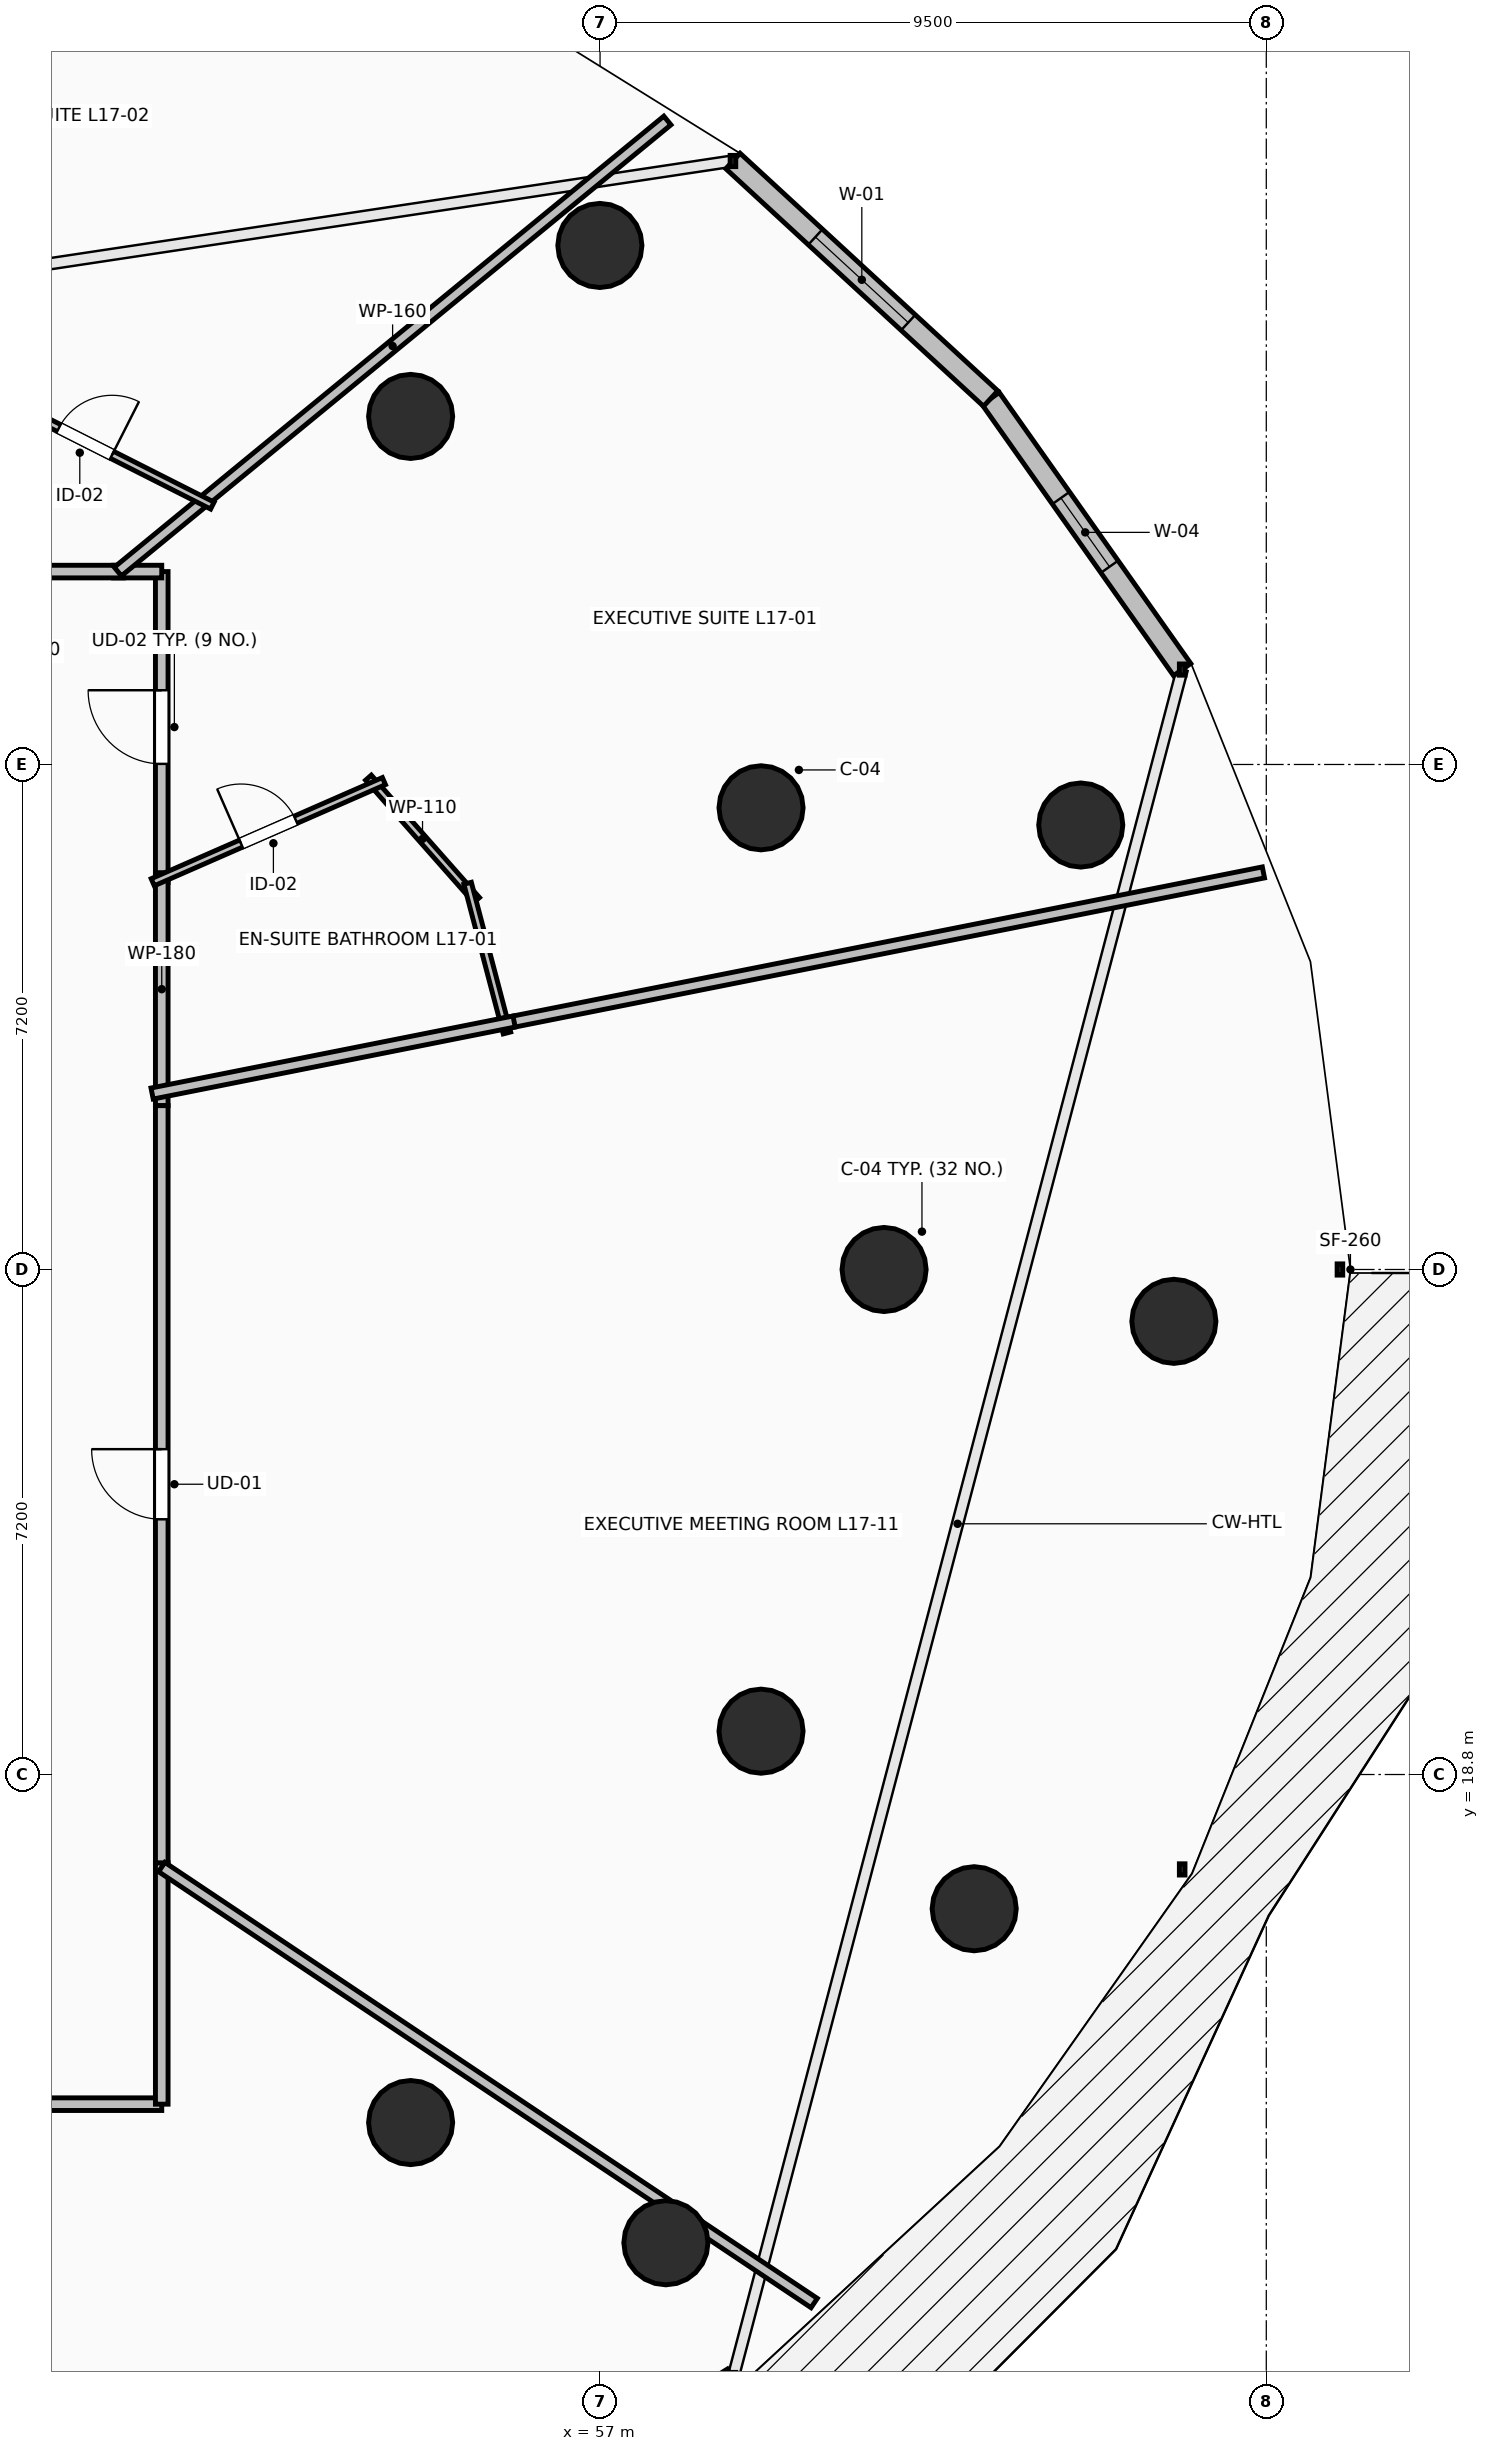
"""IFC4 building model, lengths in metres.
Left out: names, types, materials, properties, quantities, classifications, styles, units other than length and angle.
Written with IfcOpenShell. Run it as: python <this file> out.ifc"""

import sys

from ifc_helpers import new_model, si_unit, direction, frame, frame_2d, origin, origin_2d, place, context, subcontext, project, spatial, rectangle, circle, extrude, element, fill, save


model = new_model("IFC4")
c1 = context("Model", 3, precision=1e-05, world=origin(), true_north=direction((0.0, 1.0)))
c2 = subcontext(c1, "Body", "Model", "MODEL_VIEW")
j1 = project(units=[si_unit("LENGTHUNIT", "METRE"), si_unit("PLANEANGLEUNIT", "RADIAN")], contexts=[c1])
p1 = place(None, origin())
s1 = spatial("IfcSite", under=j1, at=p1, CompositionType="ELEMENT")
p2 = place(p1, origin())
s2 = spatial("IfcBuilding", under=s1, at=p2, CompositionType="ELEMENT")
p3 = place(p2, frame((0.0, 0.0, 66.0)))
s3 = spatial("IfcBuildingStorey", under=s2, at=p3, CompositionType="ELEMENT", Elevation=66.0)
for number, where, z_axis, x_axis in (
    (1, (61.05, 26.0, 0.0), (0.0, 0.0, 1.0), (1.0, 0.0, 0.0)),
    (2, (59.295, 32.582, 0.0), (0.0, 0.0, 1.0), (0.924, 0.383, 0.0)),
    (3, (54.299, 38.162, 0.0), (0.0, 0.0, 1.0), (0.707, 0.707, 0.0)),
    (4, (54.299, 13.838, 0.0), (0.0, 0.0, 1.0), (0.707, -0.707, 0.0)),
    (5, (59.295, 19.418, 0.0), (0.0, 0.0, 1.0), (0.924, -0.383, 0.0)),
    (6, (65.182, 25.261, 0.0), (0.0, 0.0, 1.0), (1.0, 0.0, 0.0)),
    (7, (63.854, 32.337, 0.0), (0.0, 0.0, 1.0), (0.924, 0.383, 0.0)),
    (8, (56.997, 40.6, 0.0), (0.0, 0.0, 1.0), (0.707, 0.707, 0.0)),
    (9, (57.939, 12.124, 0.0), (0.0, 0.0, 1.0), (0.707, -0.707, 0.0)),
    (10, (62.335, 16.886, 0.0), (0.0, 0.0, 1.0), (0.924, -0.383, 0.0)),
):
    element("IfcColumn", number, at=place(p3, frame(where, z_axis=z_axis, x_axis=x_axis)), inside=s3, PredefinedType="COLUMN", context=c2, shape_type="SweptSolid", body=[
        extrude(circle(Radius=0.6, at=origin_2d()), origin(), (0.0, 0.0, 1.0), 3.5),
    ])
p4 = place(p3, frame((65.301, 34.553, 0.0), z_axis=(0.0, 0.0, 1.0), x_axis=(-0.577130815624, 0.816651713803, 0.0)))
e11 = element("IfcWall", 11, at=p4, inside=s3, PredefinedType="STANDARD", context=c2, shape_type="SweptSolid", body=[
    extrude(rectangle(XDim=4.731, YDim=0.3, at=frame_2d((2.366, 0.0))), origin(), (0.0, 0.0, 1.0), 3.15),
])
p5 = place(p4, frame((1.795, 0.0, 0.85)))
e12 = element("IfcOpeningElement", 12, at=p5, cuts=e11, PredefinedType="OPENING", context=c2, shape_type="SweptSolid", body=[
    extrude(rectangle(XDim=1.2, YDim=1.95, at=frame_2d((0.6, 0.975))), frame((0.0, 0.165, 0.0), z_axis=(0.0, -1.0, 0.0), x_axis=(1.0, 0.0, 0.0)), (0.0, 0.0, 1.0), 0.33),
])
p6 = place(p3, frame((62.57, 38.417, 0.0), z_axis=(0.0, 0.0, 1.0), x_axis=(-0.735342629635, 0.677695519419, 0.0)))
e13 = element("IfcWall", 13, at=p6, inside=s3, PredefinedType="STANDARD", context=c2, shape_type="SweptSolid", body=[
    extrude(rectangle(XDim=4.997, YDim=0.3, at=frame_2d((2.499, 0.0))), origin(), (0.0, 0.0, 1.0), 3.15),
])
p7 = place(p6, frame((1.599, 0.0, 0.85)))
e14 = element("IfcOpeningElement", 14, at=p7, cuts=e13, PredefinedType="OPENING", context=c2, shape_type="SweptSolid", body=[
    extrude(rectangle(XDim=1.8, YDim=2.1, at=frame_2d((0.9, 1.05))), frame((0.0, 0.165, 0.0), z_axis=(0.0, -1.0, 0.0), x_axis=(1.0, 0.0, 0.0)), (0.0, 0.0, 1.0), 0.33),
])
p8 = place(p3, frame((54.417, 7.417, 0.0), z_axis=(0.0, 0.0, 1.0), x_axis=(0.849633724826, 0.527373239404, 0.0)))
e15 = element("IfcWall", 15, at=p8, inside=s3, PredefinedType="STANDARD", context=c2, shape_type="SweptSolid", body=[
    extrude(rectangle(XDim=5.271, YDim=0.3, at=frame_2d((2.635, 0.0))), origin(), (0.0, 0.0, 1.0), 3.15),
])
p9 = place(p8, frame((1.735, 0.0, 0.85)))
e16 = element("IfcOpeningElement", 16, at=p9, cuts=e15, PredefinedType="OPENING", context=c2, shape_type="SweptSolid", body=[
    extrude(rectangle(XDim=1.8, YDim=2.1, at=frame_2d((0.9, 1.05))), frame((0.0, 0.165, 0.0), z_axis=(0.0, -1.0, 0.0), x_axis=(1.0, 0.0, 0.0)), (0.0, 0.0, 1.0), 0.33),
])
p10 = place(p3, frame((50.75, 31.517, 0.0), z_axis=(0.0, 0.0, 1.0), x_axis=(0.0, 1.0, 0.0)))
e17 = element("IfcWall", 17, at=p10, inside=s3, PredefinedType="PARTITIONING", context=c2, shape_type="SweptSolid", body=[
    extrude(rectangle(XDim=4.433, YDim=0.18, at=frame_2d((2.216, 0.0))), origin(), (0.0, 0.0, 1.0), 2.342),
])
p11 = place(p10, frame((1.691, 0.0, 0.0)))
e18 = element("IfcOpeningElement", 18, at=p11, cuts=e17, PredefinedType="OPENING", context=c2, shape_type="SweptSolid", body=[
    extrude(rectangle(XDim=1.05, YDim=2.2, at=frame_2d((0.525, 1.1))), frame((0.0, 0.105, 0.0), z_axis=(0.0, -1.0, 0.0), x_axis=(1.0, 0.0, 0.0)), (0.0, 0.0, 1.0), 0.21),
])
p12 = place(p3, frame((50.75, 35.95, 0.0), z_axis=(0.0, 0.0, 1.0), x_axis=(-1.0, 0.0, 0.0)))
e19 = element("IfcWall", 19, at=p12, inside=s3, PredefinedType="PARTITIONING", context=c2, shape_type="SweptSolid", body=[
    extrude(rectangle(XDim=0.686, YDim=0.18, at=frame_2d((0.343, 0.0))), origin(), (0.0, 0.0, 1.0), 3.15),
])
p13 = place(p3, frame((50.75, 28.336, 0.0), z_axis=(0.0, 0.0, 1.0), x_axis=(0.0, 1.0, 0.0)))
e20 = element("IfcWall", 20, at=p13, inside=s3, PredefinedType="PARTITIONING", context=c2, shape_type="SweptSolid", body=[
    extrude(rectangle(XDim=3.321, YDim=0.18, at=frame_2d((1.661, 0.0))), origin(), (0.0, 0.0, 1.0), 3.15),
])
p14 = place(p3, frame((50.204, 35.95, 0.0), z_axis=(0.0, 0.0, 1.0), x_axis=(-1.0, 0.0, 0.0)))
e21 = element("IfcWall", 21, at=p14, inside=s3, PredefinedType="PARTITIONING", context=c2, shape_type="SweptSolid", body=[
    extrude(rectangle(XDim=4.424, YDim=0.18, at=frame_2d((2.212, 0.0))), origin(), (0.0, 0.0, 1.0), 2.342),
])
p15 = place(p3, frame((42.34, 14.1, 0.0), z_axis=(0.0, 0.0, 1.0), x_axis=(1.0, 0.0, 0.0)))
e22 = element("IfcWall", 22, at=p15, inside=s3, PredefinedType="PARTITIONING", context=c2, shape_type="SweptSolid", body=[
    extrude(rectangle(XDim=8.41, YDim=0.18, at=frame_2d((4.205, 0.0))), origin(), (0.0, 0.0, 1.0), 2.342),
])
p16 = place(p15, frame((3.705, 0.0, 0.0)))
e23 = element("IfcOpeningElement", 23, at=p16, cuts=e22, PredefinedType="OPENING", context=c2, shape_type="SweptSolid", body=[
    extrude(rectangle(XDim=1.0, YDim=2.15, at=frame_2d((0.5, 1.075))), frame((0.0, 0.105, 0.0), z_axis=(0.0, -1.0, 0.0), x_axis=(1.0, 0.0, 0.0)), (0.0, 0.0, 1.0), 0.21),
])
p17 = place(p3, frame((50.75, 14.1, 0.0), z_axis=(0.0, 0.0, 1.0), x_axis=(0.0, 1.0, 0.0)))
e24 = element("IfcWall", 24, at=p17, inside=s3, PredefinedType="PARTITIONING", context=c2, shape_type="SweptSolid", body=[
    extrude(rectangle(XDim=3.441, YDim=0.18, at=frame_2d((1.72, 0.0))), origin(), (0.0, 0.0, 1.0), 2.342),
])
p18 = place(p3, frame((50.75, 17.541, 0.0), z_axis=(0.0, 0.0, 1.0), x_axis=(0.0, 1.0, 0.0)))
e25 = element("IfcWall", 25, at=p18, inside=s3, PredefinedType="PARTITIONING", context=c2, shape_type="SweptSolid", body=[
    extrude(rectangle(XDim=10.795, YDim=0.18, at=frame_2d((5.397, 0.0))), origin(), (0.0, 0.0, 1.0), 2.342),
])
p19 = place(p18, frame((4.897, 0.0, 0.0)))
e26 = element("IfcOpeningElement", 26, at=p19, cuts=e25, PredefinedType="OPENING", context=c2, shape_type="SweptSolid", body=[
    extrude(rectangle(XDim=1.0, YDim=2.15, at=frame_2d((0.5, 1.075))), frame((0.0, 0.105, 0.0), z_axis=(0.0, -1.0, 0.0), x_axis=(1.0, 0.0, 0.0)), (0.0, 0.0, 1.0), 0.21),
])
p20 = place(p3, frame((53.697, 33.012, 0.0), z_axis=(0.0, 0.0, 1.0), x_axis=(0.66211021146, -0.749406477074, 0.0)))
e27 = element("IfcWall", 27, at=p20, inside=s3, PredefinedType="PARTITIONING", context=c2, shape_type="SweptSolid", body=[
    extrude(rectangle(XDim=2.33, YDim=0.11, at=frame_2d((1.165, 0.0))), origin(), (0.0, 0.0, 1.0), 2.342),
])
p21 = place(p3, frame((55.111, 31.506, 0.0), z_axis=(0.0, 0.0, 1.0), x_axis=(0.254389812051, -0.967101764823, 0.0)))
e28 = element("IfcWall", 28, at=p21, inside=s3, PredefinedType="PARTITIONING", context=c2, shape_type="SweptSolid", body=[
    extrude(rectangle(XDim=2.206, YDim=0.11, at=frame_2d((1.103, 0.0))), origin(), (0.0, 0.0, 1.0), 3.15),
])
p22 = place(p3, frame((50.622, 31.521, 0.0), z_axis=(0.0, 0.0, 1.0), x_axis=(0.91617134915, 0.400786799928, 0.0)))
e29 = element("IfcWall", 29, at=p22, inside=s3, PredefinedType="PARTITIONING", context=c2, shape_type="SweptSolid", body=[
    extrude(rectangle(XDim=3.598, YDim=0.11, at=frame_2d((1.799, 0.0))), origin(), (0.0, 0.0, 1.0), 2.342),
])
p23 = place(p22, frame((1.374, 0.0, 0.0)))
e30 = element("IfcOpeningElement", 30, at=p23, cuts=e29, PredefinedType="OPENING", context=c2, shape_type="SweptSolid", body=[
    extrude(rectangle(XDim=0.85, YDim=2.1, at=frame_2d((0.425, 1.05))), frame((0.0, 0.07, 0.0), z_axis=(0.0, -1.0, 0.0), x_axis=(1.0, 0.0, 0.0)), (0.0, 0.0, 1.0), 0.14),
])
p24 = place(p3, frame((57.96, 42.381, 0.0), z_axis=(0.0, 0.0, 1.0), x_axis=(-0.772992813725, -0.634414777515, 0.0)))
e31 = element("IfcWall", 31, at=p24, inside=s3, PredefinedType="PARTITIONING", context=c2, shape_type="SweptSolid", body=[
    extrude(rectangle(XDim=10.137, YDim=0.16, at=frame_2d((5.069, 0.0))), origin(), (0.0, 0.0, 1.0), 2.534),
])
p25 = place(p3, frame((55.637, 29.508, 0.0), z_axis=(0.0, 0.0, 1.0), x_axis=(0.980781844691, 0.195107593712, 0.0)))
e32 = element("IfcWall", 32, at=p25, inside=s3, PredefinedType="PARTITIONING", context=c2, shape_type="SweptSolid", body=[
    extrude(rectangle(XDim=11.034, YDim=0.16, at=frame_2d((5.517, 0.0))), origin(), (0.0, 0.0, 1.0), 2.534),
])
p26 = place(p3, frame((50.613, 28.509, 0.0), z_axis=(0.0, 0.0, 1.0), x_axis=(0.980788877604, 0.195072236795, 0.0)))
e33 = element("IfcWall", 33, at=p26, inside=s3, PredefinedType="PARTITIONING", context=c2, shape_type="SweptSolid", body=[
    extrude(rectangle(XDim=5.263, YDim=0.16, at=frame_2d((2.631, 0.0))), origin(), (0.0, 0.0, 1.0), 2.784),
])
p27 = place(p3, frame((47.853, 38.72, 0.0), z_axis=(0.0, 0.0, 1.0), x_axis=(0.892455812043, -0.451134817489, 0.0)))
e34 = element("IfcWall", 34, at=p27, inside=s3, PredefinedType="PARTITIONING", context=c2, shape_type="SweptSolid", body=[
    extrude(rectangle(XDim=4.055, YDim=0.11, at=frame_2d((2.027, 0.0))), origin(), (0.0, 0.0, 1.0), 3.15),
])
p28 = place(p27, frame((1.603, 0.0, 0.0)))
e35 = element("IfcOpeningElement", 35, at=p28, cuts=e34, PredefinedType="OPENING", context=c2, shape_type="SweptSolid", body=[
    extrude(rectangle(XDim=0.85, YDim=2.1, at=frame_2d((0.425, 1.05))), frame((0.0, 0.07, 0.0), z_axis=(0.0, -1.0, 0.0), x_axis=(1.0, 0.0, 0.0)), (0.0, 0.0, 1.0), 0.14),
])
p29 = place(p3, frame((60.053, 11.265, 0.0), z_axis=(0.0, 0.0, 1.0), x_axis=(-0.831469078055, 0.555571032577, 0.0)))
e36 = element("IfcWall", 36, at=p29, inside=s3, PredefinedType="PARTITIONING", context=c2, shape_type="SweptSolid", body=[
    extrude(rectangle(XDim=11.189, YDim=0.16, at=frame_2d((5.594, 0.0))), origin(), (0.0, 0.0, 1.0), 2.534),
])
p30 = place(p5, origin())
e37 = element("IfcWindow", 37, at=p30, inside=s3, PartitioningType="SINGLE_PANEL", PredefinedType="WINDOW", context=c2, shape_type="SweptSolid", body=[
    extrude(rectangle(XDim=1.2, YDim=1.95, at=frame_2d((0.6, 0.975))), frame((0.0, 0.03, 0.0), z_axis=(0.0, -1.0, 0.0), x_axis=(1.0, 0.0, 0.0)), (0.0, 0.0, 1.0), 0.06),
])
fill(e12, e37)
p31 = place(p7, origin())
e38 = element("IfcWindow", 38, at=p31, inside=s3, PartitioningType="SINGLE_PANEL", PredefinedType="WINDOW", context=c2, shape_type="SweptSolid", body=[
    extrude(rectangle(XDim=1.8, YDim=2.1, at=frame_2d((0.9, 1.05))), frame((0.0, 0.03, 0.0), z_axis=(0.0, -1.0, 0.0), x_axis=(1.0, 0.0, 0.0)), (0.0, 0.0, 1.0), 0.06),
])
fill(e14, e38)
p32 = place(p11, origin())
e39 = element("IfcDoor", 39, at=p32, inside=s3, OperationType="SINGLE_SWING_RIGHT", PredefinedType="DOOR", context=c2, shape_type="SweptSolid", body=[
    extrude(rectangle(XDim=1.05, YDim=2.2, at=frame_2d((0.525, 1.1))), frame((0.0, 0.025, 0.0), z_axis=(0.0, -1.0, 0.0), x_axis=(1.0, 0.0, 0.0)), (0.0, 0.0, 1.0), 0.05),
])
fill(e18, e39)
p33 = place(p19, origin())
e40 = element("IfcDoor", 40, at=p33, inside=s3, OperationType="SINGLE_SWING_RIGHT", PredefinedType="DOOR", context=c2, shape_type="SweptSolid", body=[
    extrude(rectangle(XDim=1.0, YDim=2.15, at=frame_2d((0.5, 1.075))), frame((0.0, 0.025, 0.0), z_axis=(0.0, -1.0, 0.0), x_axis=(1.0, 0.0, 0.0)), (0.0, 0.0, 1.0), 0.05),
])
fill(e26, e40)
p34 = place(p23, origin())
e41 = element("IfcDoor", 41, at=p34, inside=s3, OperationType="SINGLE_SWING_LEFT", PredefinedType="DOOR", context=c2, shape_type="SweptSolid", body=[
    extrude(rectangle(XDim=0.85, YDim=2.1, at=frame_2d((0.425, 1.05))), frame((0.0, 0.025, 0.0), z_axis=(0.0, -1.0, 0.0), x_axis=(1.0, 0.0, 0.0)), (0.0, 0.0, 1.0), 0.05),
])
fill(e30, e41)
p35 = place(p28, origin())
e42 = element("IfcDoor", 42, at=p35, inside=s3, OperationType="SINGLE_SWING_RIGHT", PredefinedType="DOOR", context=c2, shape_type="SweptSolid", body=[
    extrude(rectangle(XDim=0.85, YDim=2.1, at=frame_2d((0.425, 1.05))), frame((0.0, 0.025, 0.0), z_axis=(0.0, -1.0, 0.0), x_axis=(1.0, 0.0, 0.0)), (0.0, 0.0, 1.0), 0.05),
])
fill(e35, e42)
save(model, sys.argv[1])
